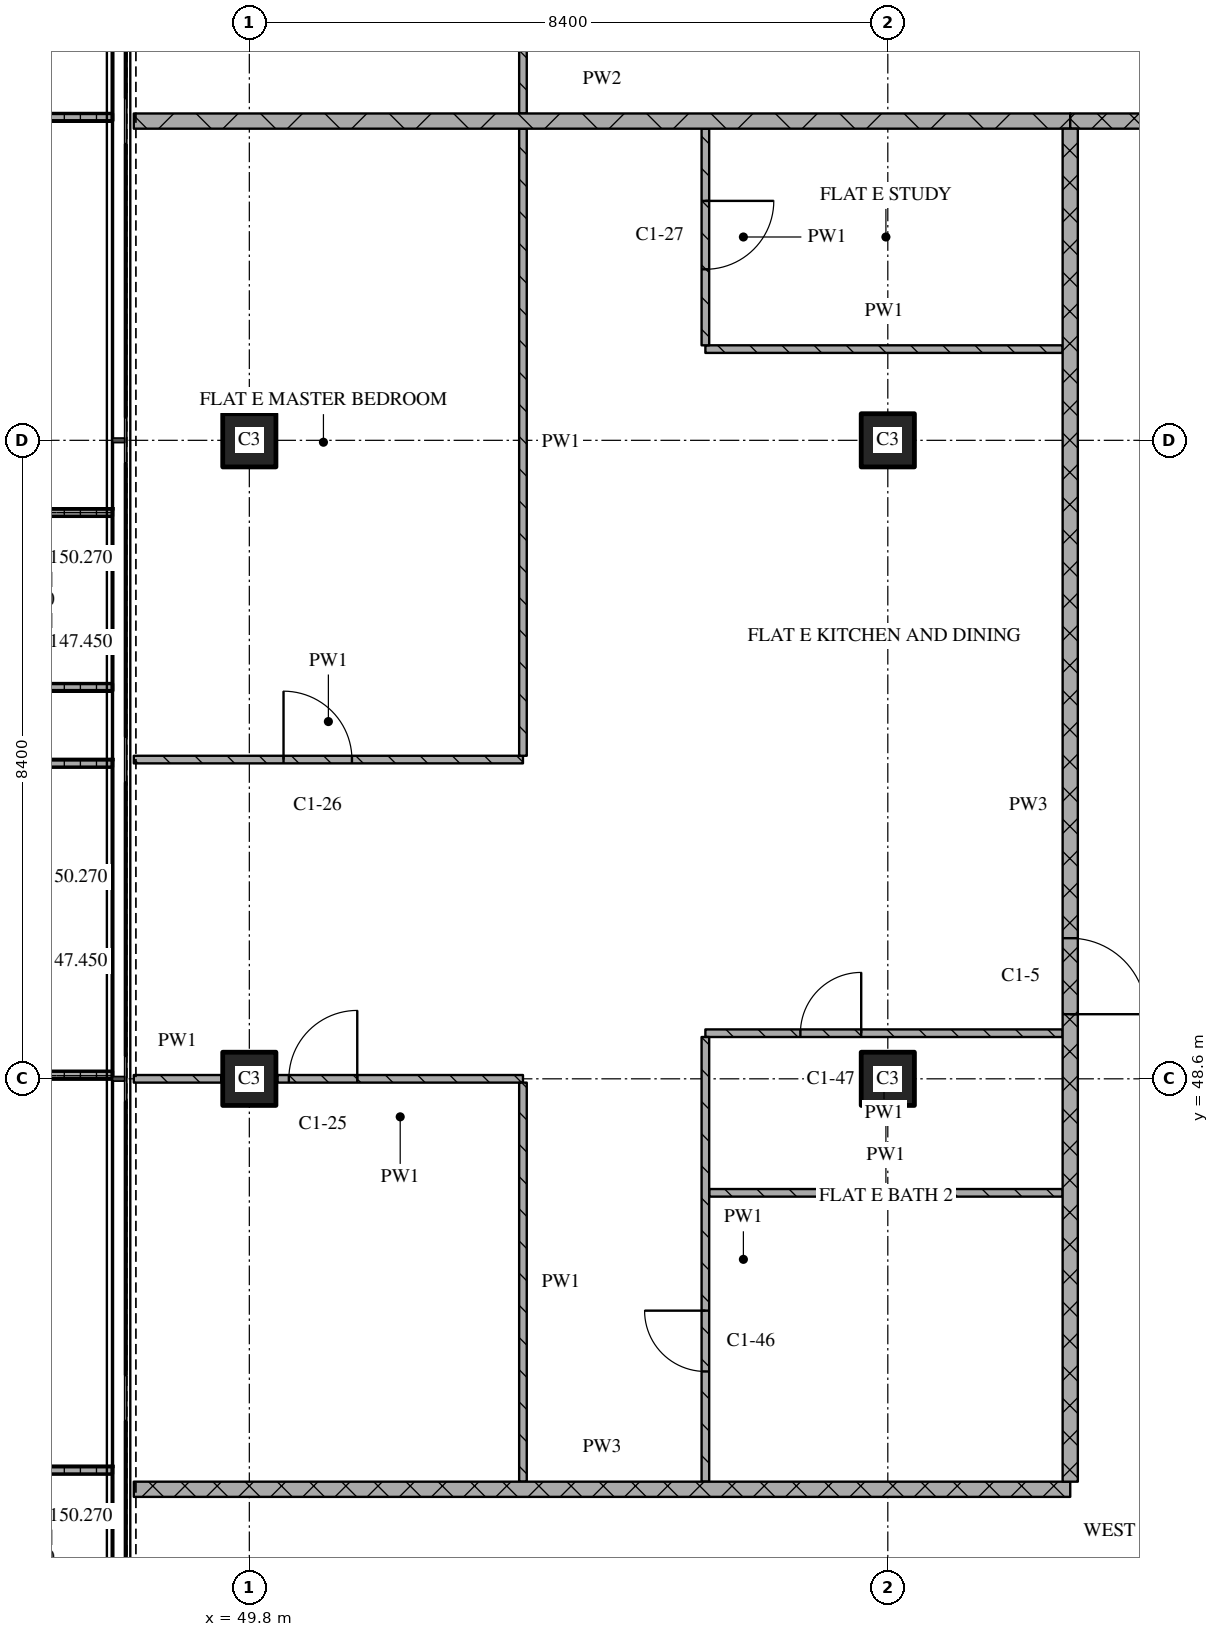
"""IFC4 building model, lengths in metres.
Left out: names, types, materials, properties, quantities, classifications, styles, units other than length and angle.
Written with IfcOpenShell. Run it as: python <this file> out.ifc"""

import sys

from ifc_helpers import new_model, si_unit, direction, frame, frame_2d, origin, origin_2d, place, context, subcontext, project, spatial, polyline, rectangle, outline, extrude, element, fill, save


model = new_model("IFC4")
c1 = context("Model", 3, precision=1e-05, world=origin(), true_north=direction((0.0, 1.0)))
c2 = subcontext(c1, "Body", "Model", "MODEL_VIEW")
j1 = project(units=[si_unit("LENGTHUNIT", "METRE"), si_unit("PLANEANGLEUNIT", "RADIAN")], contexts=[c1])
p1 = place(None, origin())
s1 = spatial("IfcSite", under=j1, at=p1, CompositionType="ELEMENT")
p2 = place(p1, origin())
s2 = spatial("IfcBuilding", under=s1, at=p2, CompositionType="ELEMENT")
p3 = place(p2, frame((0.0, 0.0, 147.45)))
s3 = spatial("IfcBuildingStorey", under=s2, at=p3, CompositionType="ELEMENT", Elevation=147.45)
for number, where, z_axis, x_axis in (
    (1, (49.8, 48.6, 0.0), (0.0, 0.0, 1.0), (1.0, 0.0, 0.0)),
    (2, (49.8, 57.0, 0.0), (0.0, 0.0, 1.0), (1.0, 0.0, 0.0)),
    (3, (58.2, 48.6, 0.0), (0.0, 0.0, 1.0), (1.0, 0.0, 0.0)),
    (4, (58.2, 57.0, 0.0), (0.0, 0.0, 1.0), (1.0, 0.0, 0.0)),
):
    element("IfcColumn", number, at=place(p3, frame(where, z_axis=z_axis, x_axis=x_axis)), inside=s3, PredefinedType="COLUMN", context=c2, shape_type="SweptSolid", body=[
        extrude(rectangle(XDim=0.7, YDim=0.7, at=origin_2d()), origin(), (0.0, 0.0, 1.0), 3.6),
    ])
p4 = place(p3, origin())
e5 = element("IfcWall", 5, at=p4, inside=s3, PredefinedType="SOLIDWALL", context=c2, shape_type="SweptSolid", body=[
    extrude(outline(polyline([(48.0, 65.4), (48.0, 65.3), (46.367, 65.3), (46.367, 61.3), (48.0, 61.3), (48.0, 61.2), (46.267, 61.2), (46.267, 65.4), (48.0, 65.4)])), origin(), (0.0, 0.0, 1.0), 1.0),
])
p5 = place(p3, origin())
e6 = element("IfcWall", 6, at=p5, inside=s3, PredefinedType="SOLIDWALL", context=c2, shape_type="SweptSolid", body=[
    extrude(outline(polyline([(48.0, 56.1), (48.0, 56.0), (46.5, 56.0), (46.5, 53.8), (48.0, 53.8), (48.0, 53.7), (46.4, 53.7), (46.4, 56.1), (48.0, 56.1)])), origin(), (0.0, 0.0, 1.0), 1.0),
])
p6 = place(p3, origin())
e7 = element("IfcWall", 7, at=p6, inside=s3, PredefinedType="SOLIDWALL", context=c2, shape_type="SweptSolid", body=[
    extrude(outline(polyline([(48.0, 52.8), (48.0, 52.7), (46.367, 52.7), (46.367, 48.7), (48.0, 48.7), (48.0, 48.6), (46.267, 48.6), (46.267, 52.8), (48.0, 52.8)])), origin(), (0.0, 0.0, 1.0), 1.0),
])
p7 = place(p3, origin())
e8 = element("IfcWall", 8, at=p7, inside=s3, PredefinedType="SOLIDWALL", context=c2, shape_type="SweptSolid", body=[
    extrude(outline(polyline([(48.0, 43.5), (48.0, 43.4), (46.5, 43.4), (46.5, 41.2), (48.0, 41.2), (48.0, 41.1), (46.4, 41.1), (46.4, 43.5), (48.0, 43.5)])), origin(), (0.0, 0.0, 1.0), 1.0),
])
p8 = place(p3, frame((48.28, 43.2, 0.0), z_axis=(0.0, 0.0, 1.0), x_axis=(1.0, 0.0, 0.0)))
e9 = element("IfcWall", 9, at=p8, inside=s3, PredefinedType="PARTITIONING", context=c2, shape_type="SweptSolid", body=[
    extrude(rectangle(XDim=12.32, YDim=0.2, at=frame_2d((6.16, 0.0))), origin(), (0.0, 0.0, 1.0), 3.32),
])
p9 = place(p3, frame((55.85, 47.1, 0.0), z_axis=(0.0, 0.0, 1.0), x_axis=(1.0, 0.0, 0.0)))
e10 = element("IfcWall", 10, at=p9, inside=s3, PredefinedType="PARTITIONING", context=c2, shape_type="SweptSolid", body=[
    extrude(rectangle(XDim=4.65, YDim=0.1, at=frame_2d((2.325, 0.0))), origin(), (0.0, 0.0, 1.0), 3.32),
])
p10 = place(p3, frame((48.28, 48.6, 0.0), z_axis=(0.0, 0.0, 1.0), x_axis=(1.0, 0.0, 0.0)))
e11 = element("IfcWall", 11, at=p10, inside=s3, PredefinedType="PARTITIONING", context=c2, shape_type="SweptSolid", body=[
    extrude(rectangle(XDim=1.15, YDim=0.1, at=frame_2d((0.575, 0.0))), origin(), (0.0, 0.0, 1.0), 3.32),
])
p11 = place(p3, frame((53.4, 48.6, 0.0), z_axis=(0.0, 0.0, 1.0), x_axis=(-1.0, 0.0, 0.0)))
e12 = element("IfcWall", 12, at=p11, inside=s3, PredefinedType="PARTITIONING", context=c2, shape_type="SweptSolid", body=[
    extrude(rectangle(XDim=3.23, YDim=0.1, at=frame_2d((1.615, 0.0))), origin(), (0.0, 0.0, 1.0), 3.32),
])
p12 = place(p11, frame((2.18, 0.0, 0.0)))
e13 = element("IfcOpeningElement", 13, at=p12, cuts=e12, PredefinedType="OPENING", context=c2, shape_type="SweptSolid", body=[
    extrude(rectangle(XDim=0.9, YDim=2.1, at=frame_2d((0.45, 1.05))), frame((0.0, 0.06, 0.0), z_axis=(0.0, -1.0, 0.0), x_axis=(1.0, 0.0, 0.0)), (0.0, 0.0, 1.0), 0.12),
])
p13 = place(p3, frame((60.5, 49.2, 0.0), z_axis=(0.0, 0.0, 1.0), x_axis=(-1.0, 0.0, 0.0)))
e14 = element("IfcWall", 14, at=p13, inside=s3, PredefinedType="PARTITIONING", context=c2, shape_type="SweptSolid", body=[
    extrude(rectangle(XDim=4.7, YDim=0.1, at=frame_2d((2.35, 0.0))), origin(), (0.0, 0.0, 1.0), 3.32),
])
p14 = place(p13, frame((2.65, 0.0, 0.0)))
e15 = element("IfcOpeningElement", 15, at=p14, cuts=e14, PredefinedType="OPENING", context=c2, shape_type="SweptSolid", body=[
    extrude(rectangle(XDim=0.8, YDim=2.1, at=frame_2d((0.4, 1.05))), frame((0.0, 0.06, 0.0), z_axis=(0.0, -1.0, 0.0), x_axis=(1.0, 0.0, 0.0)), (0.0, 0.0, 1.0), 0.12),
])
p15 = place(p3, frame((48.28, 52.8, 0.0), z_axis=(0.0, 0.0, 1.0), x_axis=(1.0, 0.0, 0.0)))
e16 = element("IfcWall", 16, at=p15, inside=s3, PredefinedType="PARTITIONING", context=c2, shape_type="SweptSolid", body=[
    extrude(rectangle(XDim=5.12, YDim=0.1, at=frame_2d((2.56, 0.0))), origin(), (0.0, 0.0, 1.0), 3.32),
])
p16 = place(p15, frame((1.97, 0.0, 0.0)))
e17 = element("IfcOpeningElement", 17, at=p16, cuts=e16, PredefinedType="OPENING", context=c2, shape_type="SweptSolid", body=[
    extrude(rectangle(XDim=0.9, YDim=2.1, at=frame_2d((0.45, 1.05))), frame((0.0, 0.06, 0.0), z_axis=(0.0, -1.0, 0.0), x_axis=(1.0, 0.0, 0.0)), (0.0, 0.0, 1.0), 0.12),
])
p17 = place(p3, frame((55.8, 58.2, 0.0), z_axis=(0.0, 0.0, 1.0), x_axis=(1.0, 0.0, 0.0)))
e18 = element("IfcWall", 18, at=p17, inside=s3, PredefinedType="PARTITIONING", context=c2, shape_type="SweptSolid", body=[
    extrude(rectangle(XDim=4.7, YDim=0.1, at=frame_2d((2.35, 0.0))), origin(), (0.0, 0.0, 1.0), 3.32),
])
p18 = place(p3, frame((60.6, 61.2, 0.0), z_axis=(0.0, 0.0, 1.0), x_axis=(1.0, 0.0, 0.0)))
e19 = element("IfcWall", 19, at=p18, inside=s3, PredefinedType="PARTITIONING", context=c2, shape_type="SweptSolid", body=[
    extrude(rectangle(XDim=3.6, YDim=0.2, at=frame_2d((1.8, 0.0))), origin(), (0.0, 0.0, 1.0), 3.32),
])
p19 = place(p3, frame((48.28, 61.2, 0.0), z_axis=(0.0, 0.0, 1.0), x_axis=(1.0, 0.0, 0.0)))
e20 = element("IfcWall", 20, at=p19, inside=s3, PredefinedType="PARTITIONING", context=c2, shape_type="SweptSolid", body=[
    extrude(rectangle(XDim=12.32, YDim=0.2, at=frame_2d((6.16, 0.0))), origin(), (0.0, 0.0, 1.0), 3.32),
])
p20 = place(p3, frame((53.4, 48.55, 0.0), z_axis=(0.0, 0.0, 1.0), x_axis=(0.0, -1.0, 0.0)))
e21 = element("IfcWall", 21, at=p20, inside=s3, PredefinedType="PARTITIONING", context=c2, shape_type="SweptSolid", body=[
    extrude(rectangle(XDim=5.25, YDim=0.1, at=frame_2d((2.625, 0.0))), origin(), (0.0, 0.0, 1.0), 3.32),
])
p21 = place(p3, frame((55.8, 49.15, 0.0), z_axis=(0.0, 0.0, 1.0), x_axis=(0.0, -1.0, 0.0)))
e22 = element("IfcWall", 22, at=p21, inside=s3, PredefinedType="PARTITIONING", context=c2, shape_type="SweptSolid", body=[
    extrude(rectangle(XDim=5.85, YDim=0.1, at=frame_2d((2.925, 0.0))), origin(), (0.0, 0.0, 1.0), 3.32),
])
p22 = place(p21, frame((3.6, 0.0, 0.0)))
e23 = element("IfcOpeningElement", 23, at=p22, cuts=e22, PredefinedType="OPENING", context=c2, shape_type="SweptSolid", body=[
    extrude(rectangle(XDim=0.8, YDim=2.1, at=frame_2d((0.4, 1.05))), frame((0.0, 0.06, 0.0), z_axis=(0.0, -1.0, 0.0), x_axis=(1.0, 0.0, 0.0)), (0.0, 0.0, 1.0), 0.12),
])
p23 = place(p3, frame((55.8, 61.1, 0.0), z_axis=(0.0, 0.0, 1.0), x_axis=(0.0, -1.0, 0.0)))
e24 = element("IfcWall", 24, at=p23, inside=s3, PredefinedType="PARTITIONING", context=c2, shape_type="SweptSolid", body=[
    extrude(rectangle(XDim=2.85, YDim=0.1, at=frame_2d((1.425, 0.0))), origin(), (0.0, 0.0, 1.0), 3.32),
])
p24 = place(p23, frame((0.95, 0.0, 0.0)))
e25 = element("IfcOpeningElement", 25, at=p24, cuts=e24, PredefinedType="OPENING", context=c2, shape_type="SweptSolid", body=[
    extrude(rectangle(XDim=0.9, YDim=2.1, at=frame_2d((0.45, 1.05))), frame((0.0, 0.06, 0.0), z_axis=(0.0, -1.0, 0.0), x_axis=(1.0, 0.0, 0.0)), (0.0, 0.0, 1.0), 0.12),
])
p25 = place(p3, frame((60.6, 43.3, 0.0), z_axis=(0.0, 0.0, 1.0), x_axis=(0.0, 1.0, 0.0)))
e26 = element("IfcWall", 26, at=p25, inside=s3, PredefinedType="PARTITIONING", context=c2, shape_type="SweptSolid", body=[
    extrude(rectangle(XDim=17.8, YDim=0.2, at=frame_2d((8.9, 0.0))), origin(), (0.0, 0.0, 1.0), 3.32),
])
p26 = place(p25, frame((6.15, 0.0, 0.0)))
e27 = element("IfcOpeningElement", 27, at=p26, cuts=e26, PredefinedType="OPENING", context=c2, shape_type="SweptSolid", body=[
    extrude(rectangle(XDim=1.0, YDim=2.1, at=frame_2d((0.5, 1.05))), frame((0.0, 0.11, 0.0), z_axis=(0.0, -1.0, 0.0), x_axis=(1.0, 0.0, 0.0)), (0.0, 0.0, 1.0), 0.22),
])
p27 = place(p3, frame((53.4, 61.1, 0.0), z_axis=(0.0, 0.0, 1.0), x_axis=(0.0, -1.0, 0.0)))
e28 = element("IfcWall", 28, at=p27, inside=s3, PredefinedType="PARTITIONING", context=c2, shape_type="SweptSolid", body=[
    extrude(rectangle(XDim=8.25, YDim=0.1, at=frame_2d((4.125, 0.0))), origin(), (0.0, 0.0, 1.0), 3.32),
])
p28 = place(p3, frame((53.4, 61.3, 0.0), z_axis=(0.0, 0.0, 1.0), x_axis=(0.0, 1.0, 0.0)))
e29 = element("IfcWall", 29, at=p28, inside=s3, PredefinedType="PARTITIONING", context=c2, shape_type="SweptSolid", body=[
    extrude(rectangle(XDim=8.25, YDim=0.1, at=frame_2d((4.125, 0.0))), origin(), (0.0, 0.0, 1.0), 3.32),
])
p29 = place(p28, frame((3.65, 0.0, 0.0)))
e30 = element("IfcOpeningElement", 30, at=p29, cuts=e29, PredefinedType="OPENING", context=c2, shape_type="SweptSolid", body=[
    extrude(rectangle(XDim=0.9, YDim=2.1, at=frame_2d((0.45, 1.05))), frame((0.0, 0.06, 0.0), z_axis=(0.0, -1.0, 0.0), x_axis=(1.0, 0.0, 0.0)), (0.0, 0.0, 1.0), 0.12),
])
p30 = place(p12, origin())
e31 = element("IfcDoor", 31, at=p30, inside=s3, OperationType="SINGLE_SWING_RIGHT", PredefinedType="DOOR", context=c2, shape_type="SweptSolid", body=[
    extrude(rectangle(XDim=0.9, YDim=2.1, at=frame_2d((0.45, 1.05))), frame((0.0, 0.025, 0.0), z_axis=(0.0, -1.0, 0.0), x_axis=(1.0, 0.0, 0.0)), (0.0, 0.0, 1.0), 0.05),
])
fill(e13, e31)
p31 = place(p14, origin())
e32 = element("IfcDoor", 32, at=p31, inside=s3, OperationType="SINGLE_SWING_RIGHT", PredefinedType="DOOR", context=c2, shape_type="SweptSolid", body=[
    extrude(rectangle(XDim=0.8, YDim=2.1, at=frame_2d((0.4, 1.05))), frame((0.0, 0.025, 0.0), z_axis=(0.0, -1.0, 0.0), x_axis=(1.0, 0.0, 0.0)), (0.0, 0.0, 1.0), 0.05),
])
fill(e15, e32)
p32 = place(p16, origin())
e33 = element("IfcDoor", 33, at=p32, inside=s3, OperationType="SINGLE_SWING_LEFT", PredefinedType="DOOR", context=c2, shape_type="SweptSolid", body=[
    extrude(rectangle(XDim=0.9, YDim=2.1, at=frame_2d((0.45, 1.05))), frame((0.0, 0.025, 0.0), z_axis=(0.0, -1.0, 0.0), x_axis=(1.0, 0.0, 0.0)), (0.0, 0.0, 1.0), 0.05),
])
fill(e17, e33)
p33 = place(p22, origin())
e34 = element("IfcDoor", 34, at=p33, inside=s3, OperationType="SINGLE_SWING_RIGHT", PredefinedType="DOOR", context=c2, shape_type="SweptSolid", body=[
    extrude(rectangle(XDim=0.8, YDim=2.1, at=frame_2d((0.4, 1.05))), frame((0.0, 0.025, 0.0), z_axis=(0.0, -1.0, 0.0), x_axis=(1.0, 0.0, 0.0)), (0.0, 0.0, 1.0), 0.05),
])
fill(e23, e34)
p34 = place(p24, origin())
e35 = element("IfcDoor", 35, at=p34, inside=s3, OperationType="SINGLE_SWING_LEFT", PredefinedType="DOOR", context=c2, shape_type="SweptSolid", body=[
    extrude(rectangle(XDim=0.9, YDim=2.1, at=frame_2d((0.45, 1.05))), frame((0.0, 0.025, 0.0), z_axis=(0.0, -1.0, 0.0), x_axis=(1.0, 0.0, 0.0)), (0.0, 0.0, 1.0), 0.05),
])
fill(e25, e35)
p35 = place(p26, origin())
e36 = element("IfcDoor", 36, at=p35, inside=s3, OperationType="SINGLE_SWING_RIGHT", PredefinedType="DOOR", context=c2, shape_type="SweptSolid", body=[
    extrude(rectangle(XDim=1.0, YDim=2.1, at=frame_2d((0.5, 1.05))), frame((0.0, 0.025, 0.0), z_axis=(0.0, -1.0, 0.0), x_axis=(1.0, 0.0, 0.0)), (0.0, 0.0, 1.0), 0.05),
])
fill(e27, e36)
save(model, sys.argv[1])
